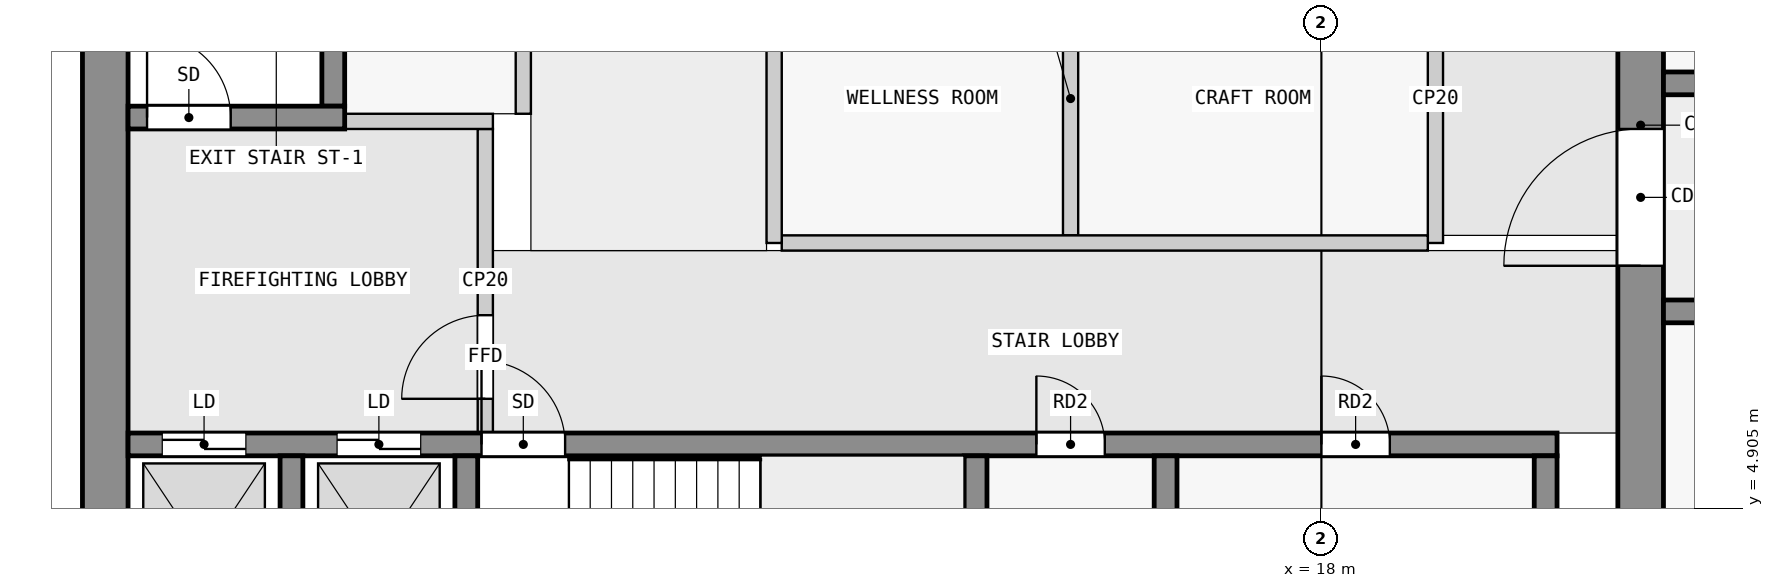
"""IFC4 building model, lengths in metres.
Left out: names, types, materials, properties, quantities, classifications, styles, units other than length and angle.
Written with IfcOpenShell. Run it as: python <this file> out.ifc"""

import sys

from ifc_helpers import new_model, si_unit, direction, frame, frame_2d, origin, place, context, subcontext, project, spatial, rectangle, extrude, element, fill, save


model = new_model("IFC4")
c1 = context("Model", 3, precision=1e-05, world=origin(), true_north=direction((0.0, 1.0)))
c2 = subcontext(c1, "Body", "Model", "MODEL_VIEW")
j1 = project(units=[si_unit("LENGTHUNIT", "METRE"), si_unit("PLANEANGLEUNIT", "RADIAN")], contexts=[c1])
p1 = place(None, origin())
s1 = spatial("IfcSite", under=j1, at=p1, CompositionType="ELEMENT")
p2 = place(p1, origin())
s2 = spatial("IfcBuilding", under=s1, at=p2, CompositionType="ELEMENT")
p3 = place(p2, frame((0.0, 0.0, 167.4)))
s3 = spatial("IfcBuildingStorey", under=s2, at=p3, CompositionType="ELEMENT", Elevation=167.4)
p4 = place(p3, frame((2.0, 2.5, 0.0), z_axis=(0.0, 0.0, 1.0), x_axis=(0.0, 1.0, 0.0)))
e1 = element("IfcWall", 1, at=p4, inside=s3, PredefinedType="SHEAR", context=c2, shape_type="SweptSolid", body=[
    extrude(rectangle(XDim=14.9, YDim=0.6, at=frame_2d((7.45, 0.0))), origin(), (0.0, 0.0, 1.0), 3.25),
])
p5 = place(p3, frame((22.2, 2.5, 0.0), z_axis=(0.0, 0.0, 1.0), x_axis=(0.0, 1.0, 0.0)))
e2 = element("IfcWall", 2, at=p5, inside=s3, PredefinedType="SHEAR", context=c2, shape_type="SweptSolid", body=[
    extrude(rectangle(XDim=14.9, YDim=0.6, at=frame_2d((7.45, 0.0))), origin(), (0.0, 0.0, 1.0), 3.25),
])
p6 = place(p5, frame((5.6, 0.0, 0.0)))
e3 = element("IfcOpeningElement", 3, at=p6, cuts=e2, PredefinedType="OPENING", context=c2, shape_type="SweptSolid", body=[
    extrude(rectangle(XDim=1.8, YDim=2.1, at=frame_2d((0.9, 1.05))), frame((0.0, 0.31, 0.0), z_axis=(0.0, -1.0, 0.0), x_axis=(1.0, 0.0, 0.0)), (0.0, 0.0, 1.0), 0.62),
])
for number, where, z_axis, x_axis in (
    (4, (4.45, 2.8, 0.0), (0.0, 0.0, 1.0), (0.0, 1.0, 0.0)),
    (5, (6.75, 2.8, 0.0), (0.0, 0.0, 1.0), (0.0, 1.0, 0.0)),
    (6, (13.45, 2.8, 0.0), (0.0, 0.0, 1.0), (0.0, 1.0, 0.0)),
    (7, (15.95, 2.8, 0.0), (0.0, 0.0, 1.0), (0.0, 1.0, 0.0)),
    (8, (20.95, 2.8, 0.0), (0.0, 0.0, 1.0), (0.0, 1.0, 0.0)),
):
    element("IfcWall", number, at=place(p3, frame(where, z_axis=z_axis, x_axis=x_axis)), inside=s3, PredefinedType="SHEAR", context=c2, shape_type="SweptSolid", body=[
        extrude(rectangle(XDim=2.8, YDim=0.3, at=frame_2d((1.4, 0.0))), origin(), (0.0, 0.0, 1.0), 3.25),
    ])
p7 = place(p3, frame((2.3, 5.75, 0.0), z_axis=(0.0, 0.0, 1.0), x_axis=(1.0, 0.0, 0.0)))
e9 = element("IfcWall", 9, at=p7, inside=s3, PredefinedType="SHEAR", context=c2, shape_type="SweptSolid", body=[
    extrude(rectangle(XDim=18.8, YDim=0.3, at=frame_2d((9.4, 0.0))), origin(), (0.0, 0.0, 1.0), 3.25),
])
p8 = place(p7, frame((4.65, 0.0, 0.0)))
e10 = element("IfcOpeningElement", 10, at=p8, cuts=e9, PredefinedType="OPENING", context=c2, shape_type="SweptSolid", body=[
    extrude(rectangle(XDim=1.1, YDim=2.1, at=frame_2d((0.55, 1.05))), frame((0.0, 0.16, 0.0), z_axis=(0.0, -1.0, 0.0), x_axis=(1.0, 0.0, 0.0)), (0.0, 0.0, 1.0), 0.32),
])
p9 = place(p7, frame((0.45, 0.0, 0.0)))
e11 = element("IfcOpeningElement", 11, at=p9, cuts=e9, PredefinedType="OPENING", context=c2, shape_type="SweptSolid", body=[
    extrude(rectangle(XDim=1.1, YDim=2.1, at=frame_2d((0.55, 1.05))), frame((0.0, 0.16, 0.0), z_axis=(0.0, -1.0, 0.0), x_axis=(1.0, 0.0, 0.0)), (0.0, 0.0, 1.0), 0.32),
])
p10 = place(p7, frame((2.75, 0.0, 0.0)))
e12 = element("IfcOpeningElement", 12, at=p10, cuts=e9, PredefinedType="OPENING", context=c2, shape_type="SweptSolid", body=[
    extrude(rectangle(XDim=1.1, YDim=2.1, at=frame_2d((0.55, 1.05))), frame((0.0, 0.16, 0.0), z_axis=(0.0, -1.0, 0.0), x_axis=(1.0, 0.0, 0.0)), (0.0, 0.0, 1.0), 0.32),
])
p11 = place(p7, frame((11.95, 0.0, 0.0)))
e13 = element("IfcOpeningElement", 13, at=p11, cuts=e9, PredefinedType="OPENING", context=c2, shape_type="SweptSolid", body=[
    extrude(rectangle(XDim=0.9, YDim=2.1, at=frame_2d((0.45, 1.05))), frame((0.0, 0.16, 0.0), z_axis=(0.0, -1.0, 0.0), x_axis=(1.0, 0.0, 0.0)), (0.0, 0.0, 1.0), 0.32),
])
p12 = place(p7, frame((15.7, 0.0, 0.0)))
e14 = element("IfcOpeningElement", 14, at=p12, cuts=e9, PredefinedType="OPENING", context=c2, shape_type="SweptSolid", body=[
    extrude(rectangle(XDim=0.9, YDim=2.1, at=frame_2d((0.45, 1.05))), frame((0.0, 0.16, 0.0), z_axis=(0.0, -1.0, 0.0), x_axis=(1.0, 0.0, 0.0)), (0.0, 0.0, 1.0), 0.32),
])
p13 = place(p3, frame((2.3, 10.05, 0.0), z_axis=(0.0, 0.0, 1.0), x_axis=(1.0, 0.0, 0.0)))
e15 = element("IfcWall", 15, at=p13, inside=s3, PredefinedType="SHEAR", context=c2, shape_type="SweptSolid", body=[
    extrude(rectangle(XDim=2.85, YDim=0.3, at=frame_2d((1.425, 0.0))), origin(), (0.0, 0.0, 1.0), 3.25),
])
p14 = place(p13, frame((0.25, 0.0, 0.0)))
e16 = element("IfcOpeningElement", 16, at=p14, cuts=e15, PredefinedType="OPENING", context=c2, shape_type="SweptSolid", body=[
    extrude(rectangle(XDim=1.1, YDim=2.1, at=frame_2d((0.55, 1.05))), frame((0.0, 0.16, 0.0), z_axis=(0.0, -1.0, 0.0), x_axis=(1.0, 0.0, 0.0)), (0.0, 0.0, 1.0), 0.32),
])
p15 = place(p3, frame((5.0, 10.2, 0.0), z_axis=(0.0, 0.0, 1.0), x_axis=(0.0, 1.0, 0.0)))
e17 = element("IfcWall", 17, at=p15, inside=s3, PredefinedType="SHEAR", context=c2, shape_type="SweptSolid", body=[
    extrude(rectangle(XDim=6.4, YDim=0.3, at=frame_2d((3.2, 0.0))), origin(), (0.0, 0.0, 1.0), 3.25),
])
p16 = place(p3, frame((22.5, 7.5, 0.0), z_axis=(0.0, 0.0, 1.0), x_axis=(1.0, 0.0, 0.0)))
e18 = element("IfcWall", 18, at=p16, inside=s3, PredefinedType="SHEAR", context=c2, shape_type="SweptSolid", body=[
    extrude(rectangle(XDim=22.5, YDim=0.3, at=frame_2d((11.25, 0.0))), origin(), (0.0, 0.0, 1.0), 3.25),
])
p17 = place(p16, frame((1.75, 0.0, 0.0)))
e19 = element("IfcOpeningElement", 19, at=p17, cuts=e18, PredefinedType="OPENING", context=c2, shape_type="SweptSolid", body=[
    extrude(rectangle(XDim=1.0, YDim=2.1, at=frame_2d((0.5, 1.05))), frame((0.0, 0.16, 0.0), z_axis=(0.0, -1.0, 0.0), x_axis=(1.0, 0.0, 0.0)), (0.0, 0.0, 1.0), 0.32),
])
p18 = place(p16, frame((6.25, 0.0, 0.0)))
e20 = element("IfcOpeningElement", 20, at=p18, cuts=e18, PredefinedType="OPENING", context=c2, shape_type="SweptSolid", body=[
    extrude(rectangle(XDim=1.0, YDim=2.1, at=frame_2d((0.5, 1.05))), frame((0.0, 0.16, 0.0), z_axis=(0.0, -1.0, 0.0), x_axis=(1.0, 0.0, 0.0)), (0.0, 0.0, 1.0), 0.32),
])
p19 = place(p16, frame((10.75, 0.0, 0.0)))
e21 = element("IfcOpeningElement", 21, at=p19, cuts=e18, PredefinedType="OPENING", context=c2, shape_type="SweptSolid", body=[
    extrude(rectangle(XDim=1.0, YDim=2.1, at=frame_2d((0.5, 1.05))), frame((0.0, 0.16, 0.0), z_axis=(0.0, -1.0, 0.0), x_axis=(1.0, 0.0, 0.0)), (0.0, 0.0, 1.0), 0.32),
])
p20 = place(p16, frame((15.25, 0.0, 0.0)))
e22 = element("IfcOpeningElement", 22, at=p20, cuts=e18, PredefinedType="OPENING", context=c2, shape_type="SweptSolid", body=[
    extrude(rectangle(XDim=1.0, YDim=2.1, at=frame_2d((0.5, 1.05))), frame((0.0, 0.16, 0.0), z_axis=(0.0, -1.0, 0.0), x_axis=(1.0, 0.0, 0.0)), (0.0, 0.0, 1.0), 0.32),
])
p21 = place(p16, frame((18.75, 0.0, 0.0)))
e23 = element("IfcOpeningElement", 23, at=p21, cuts=e18, PredefinedType="OPENING", context=c2, shape_type="SweptSolid", body=[
    extrude(rectangle(XDim=0.9, YDim=2.1, at=frame_2d((0.45, 1.05))), frame((0.0, 0.16, 0.0), z_axis=(0.0, -1.0, 0.0), x_axis=(1.0, 0.0, 0.0)), (0.0, 0.0, 1.0), 0.32),
])
p22 = place(p16, frame((20.95, 0.0, 0.0)))
e24 = element("IfcOpeningElement", 24, at=p22, cuts=e18, PredefinedType="OPENING", context=c2, shape_type="SweptSolid", body=[
    extrude(rectangle(XDim=1.0, YDim=2.1, at=frame_2d((0.5, 1.05))), frame((0.0, 0.16, 0.0), z_axis=(0.0, -1.0, 0.0), x_axis=(1.0, 0.0, 0.0)), (0.0, 0.0, 1.0), 0.32),
])
p23 = place(p3, frame((22.5, 10.5, 0.0), z_axis=(0.0, 0.0, 1.0), x_axis=(1.0, 0.0, 0.0)))
e25 = element("IfcWall", 25, at=p23, inside=s3, PredefinedType="SHEAR", context=c2, shape_type="SweptSolid", body=[
    extrude(rectangle(XDim=22.5, YDim=0.3, at=frame_2d((11.25, 0.0))), origin(), (0.0, 0.0, 1.0), 3.25),
])
p24 = place(p23, frame((1.75, 0.0, 0.0)))
e26 = element("IfcOpeningElement", 26, at=p24, cuts=e25, PredefinedType="OPENING", context=c2, shape_type="SweptSolid", body=[
    extrude(rectangle(XDim=1.0, YDim=2.1, at=frame_2d((0.5, 1.05))), frame((0.0, 0.16, 0.0), z_axis=(0.0, -1.0, 0.0), x_axis=(1.0, 0.0, 0.0)), (0.0, 0.0, 1.0), 0.32),
])
p25 = place(p23, frame((6.25, 0.0, 0.0)))
e27 = element("IfcOpeningElement", 27, at=p25, cuts=e25, PredefinedType="OPENING", context=c2, shape_type="SweptSolid", body=[
    extrude(rectangle(XDim=1.0, YDim=2.1, at=frame_2d((0.5, 1.05))), frame((0.0, 0.16, 0.0), z_axis=(0.0, -1.0, 0.0), x_axis=(1.0, 0.0, 0.0)), (0.0, 0.0, 1.0), 0.32),
])
p26 = place(p23, frame((10.35, 0.0, 0.0)))
e28 = element("IfcOpeningElement", 28, at=p26, cuts=e25, PredefinedType="OPENING", context=c2, shape_type="SweptSolid", body=[
    extrude(rectangle(XDim=1.8, YDim=2.1, at=frame_2d((0.9, 1.05))), frame((0.0, 0.16, 0.0), z_axis=(0.0, -1.0, 0.0), x_axis=(1.0, 0.0, 0.0)), (0.0, 0.0, 1.0), 0.32),
])
p27 = place(p23, frame((16.85, 0.0, 0.0)))
e29 = element("IfcOpeningElement", 29, at=p27, cuts=e25, PredefinedType="OPENING", context=c2, shape_type="SweptSolid", body=[
    extrude(rectangle(XDim=1.0, YDim=2.1, at=frame_2d((0.5, 1.05))), frame((0.0, 0.16, 0.0), z_axis=(0.0, -1.0, 0.0), x_axis=(1.0, 0.0, 0.0)), (0.0, 0.0, 1.0), 0.32),
])
p28 = place(p3, frame((7.0, 5.9, 0.0), z_axis=(0.0, 0.0, 1.0), x_axis=(0.0, 1.0, 0.0)))
e30 = element("IfcWall", 30, at=p28, inside=s3, PredefinedType="PARTITIONING", context=c2, shape_type="SweptSolid", body=[
    extrude(rectangle(XDim=4.0, YDim=0.2, at=frame_2d((2.0, 0.0))), origin(), (0.0, 0.0, 1.0), 3.25),
])
p29 = place(p28, frame((0.45, 0.0, 0.0)))
e31 = element("IfcOpeningElement", 31, at=p29, cuts=e30, PredefinedType="OPENING", context=c2, shape_type="SweptSolid", body=[
    extrude(rectangle(XDim=1.1, YDim=2.1, at=frame_2d((0.55, 1.05))), frame((0.0, 0.11, 0.0), z_axis=(0.0, -1.0, 0.0), x_axis=(1.0, 0.0, 0.0)), (0.0, 0.0, 1.0), 0.22),
])
p30 = place(p3, frame((5.15, 10.0, 0.0), z_axis=(0.0, 0.0, 1.0), x_axis=(1.0, 0.0, 0.0)))
e32 = element("IfcWall", 32, at=p30, inside=s3, PredefinedType="PARTITIONING", context=c2, shape_type="SweptSolid", body=[
    extrude(rectangle(XDim=1.95, YDim=0.2, at=frame_2d((0.975, 0.0))), origin(), (0.0, 0.0, 1.0), 3.25),
])
p31 = place(p3, frame((10.8, 8.4, 0.0), z_axis=(0.0, 0.0, 1.0), x_axis=(0.0, 1.0, 0.0)))
e33 = element("IfcWall", 33, at=p31, inside=s3, PredefinedType="PARTITIONING", context=c2, shape_type="SweptSolid", body=[
    extrude(rectangle(XDim=3.8, YDim=0.2, at=frame_2d((1.9, 0.0))), origin(), (0.0, 0.0, 1.0), 3.25),
])
p32 = place(p3, frame((10.9, 8.4, 0.0), z_axis=(0.0, 0.0, 1.0), x_axis=(1.0, 0.0, 0.0)))
e34 = element("IfcWall", 34, at=p32, inside=s3, PredefinedType="PARTITIONING", context=c2, shape_type="SweptSolid", body=[
    extrude(rectangle(XDim=8.5, YDim=0.2, at=frame_2d((4.25, 0.0))), origin(), (0.0, 0.0, 1.0), 3.25),
])
p33 = place(p3, frame((19.5, 8.4, 0.0), z_axis=(0.0, 0.0, 1.0), x_axis=(0.0, 1.0, 0.0)))
e35 = element("IfcWall", 35, at=p33, inside=s3, PredefinedType="PARTITIONING", context=c2, shape_type="SweptSolid", body=[
    extrude(rectangle(XDim=3.8, YDim=0.2, at=frame_2d((1.9, 0.0))), origin(), (0.0, 0.0, 1.0), 3.25),
])
p34 = place(p3, frame((14.7, 8.5, 0.0), z_axis=(0.0, 0.0, 1.0), x_axis=(0.0, 1.0, 0.0)))
e36 = element("IfcWall", 36, at=p34, inside=s3, PredefinedType="PARTITIONING", context=c2, shape_type="SweptSolid", body=[
    extrude(rectangle(XDim=3.6, YDim=0.2, at=frame_2d((1.8, 0.0))), origin(), (0.0, 0.0, 1.0), 3.25),
])
p35 = place(p3, frame((7.5, 10.1, 0.0), z_axis=(0.0, 0.0, 1.0), x_axis=(0.0, 1.0, 0.0)))
e37 = element("IfcWall", 37, at=p35, inside=s3, PredefinedType="PARTITIONING", context=c2, shape_type="SweptSolid", body=[
    extrude(rectangle(XDim=7.3, YDim=0.2, at=frame_2d((3.65, 0.0))), origin(), (0.0, 0.0, 1.0), 3.25),
])
p36 = place(p35, frame((1.05, 0.0, 0.0)))
e38 = element("IfcOpeningElement", 38, at=p36, cuts=e37, PredefinedType="OPENING", context=c2, shape_type="SweptSolid", body=[
    extrude(rectangle(XDim=0.9, YDim=2.1, at=frame_2d((0.45, 1.05))), frame((0.0, 0.11, 0.0), z_axis=(0.0, -1.0, 0.0), x_axis=(1.0, 0.0, 0.0)), (0.0, 0.0, 1.0), 0.22),
])
p37 = place(p35, frame((4.7, 0.0, 0.0)))
e39 = element("IfcOpeningElement", 39, at=p37, cuts=e37, PredefinedType="OPENING", context=c2, shape_type="SweptSolid", body=[
    extrude(rectangle(XDim=0.9, YDim=2.1, at=frame_2d((0.45, 1.05))), frame((0.0, 0.11, 0.0), z_axis=(0.0, -1.0, 0.0), x_axis=(1.0, 0.0, 0.0)), (0.0, 0.0, 1.0), 0.22),
])
p38 = place(p29, origin())
e40 = element("IfcDoor", 40, at=p38, inside=s3, OperationType="SINGLE_SWING_LEFT", PredefinedType="DOOR", context=c2, shape_type="SweptSolid", body=[
    extrude(rectangle(XDim=1.1, YDim=2.1, at=frame_2d((0.55, 1.05))), frame((0.0, 0.025, 0.0), z_axis=(0.0, -1.0, 0.0), x_axis=(1.0, 0.0, 0.0)), (0.0, 0.0, 1.0), 0.05),
])
fill(e31, e40)
p39 = place(p14, origin())
e41 = element("IfcDoor", 41, at=p39, inside=s3, OperationType="SINGLE_SWING_RIGHT", PredefinedType="DOOR", context=c2, shape_type="SweptSolid", body=[
    extrude(rectangle(XDim=1.1, YDim=2.1, at=frame_2d((0.55, 1.05))), frame((0.0, 0.025, 0.0), z_axis=(0.0, -1.0, 0.0), x_axis=(1.0, 0.0, 0.0)), (0.0, 0.0, 1.0), 0.05),
])
fill(e16, e41)
p40 = place(p8, origin())
e42 = element("IfcDoor", 42, at=p40, inside=s3, OperationType="SINGLE_SWING_LEFT", PredefinedType="DOOR", context=c2, shape_type="SweptSolid", body=[
    extrude(rectangle(XDim=1.1, YDim=2.1, at=frame_2d((0.55, 1.05))), frame((0.0, 0.025, 0.0), z_axis=(0.0, -1.0, 0.0), x_axis=(1.0, 0.0, 0.0)), (0.0, 0.0, 1.0), 0.05),
])
fill(e10, e42)
p41 = place(p9, origin())
e43 = element("IfcDoor", 43, at=p41, inside=s3, OperationType="DOUBLE_DOOR_SLIDING", PredefinedType="DOOR", context=c2, shape_type="SweptSolid", body=[
    extrude(rectangle(XDim=1.1, YDim=2.1, at=frame_2d((0.55, 1.05))), frame((0.0, 0.025, 0.0), z_axis=(0.0, -1.0, 0.0), x_axis=(1.0, 0.0, 0.0)), (0.0, 0.0, 1.0), 0.05),
])
fill(e11, e43)
p42 = place(p10, origin())
e44 = element("IfcDoor", 44, at=p42, inside=s3, OperationType="DOUBLE_DOOR_SLIDING", PredefinedType="DOOR", context=c2, shape_type="SweptSolid", body=[
    extrude(rectangle(XDim=1.1, YDim=2.1, at=frame_2d((0.55, 1.05))), frame((0.0, 0.025, 0.0), z_axis=(0.0, -1.0, 0.0), x_axis=(1.0, 0.0, 0.0)), (0.0, 0.0, 1.0), 0.05),
])
fill(e12, e44)
p43 = place(p6, origin())
e45 = element("IfcDoor", 45, at=p43, inside=s3, OperationType="DOUBLE_DOOR_SINGLE_SWING", PredefinedType="DOOR", context=c2, shape_type="SweptSolid", body=[
    extrude(rectangle(XDim=1.8, YDim=2.1, at=frame_2d((0.9, 1.05))), frame((0.0, 0.025, 0.0), z_axis=(0.0, -1.0, 0.0), x_axis=(1.0, 0.0, 0.0)), (0.0, 0.0, 1.0), 0.05),
])
fill(e3, e45)
p44 = place(p11, origin())
e46 = element("IfcDoor", 46, at=p44, inside=s3, OperationType="SINGLE_SWING_LEFT", PredefinedType="DOOR", context=c2, shape_type="SweptSolid", body=[
    extrude(rectangle(XDim=0.9, YDim=2.1, at=frame_2d((0.45, 1.05))), frame((0.0, 0.025, 0.0), z_axis=(0.0, -1.0, 0.0), x_axis=(1.0, 0.0, 0.0)), (0.0, 0.0, 1.0), 0.05),
])
fill(e13, e46)
p45 = place(p12, origin())
e47 = element("IfcDoor", 47, at=p45, inside=s3, OperationType="SINGLE_SWING_LEFT", PredefinedType="DOOR", context=c2, shape_type="SweptSolid", body=[
    extrude(rectangle(XDim=0.9, YDim=2.1, at=frame_2d((0.45, 1.05))), frame((0.0, 0.025, 0.0), z_axis=(0.0, -1.0, 0.0), x_axis=(1.0, 0.0, 0.0)), (0.0, 0.0, 1.0), 0.05),
])
fill(e14, e47)
save(model, sys.argv[1])
